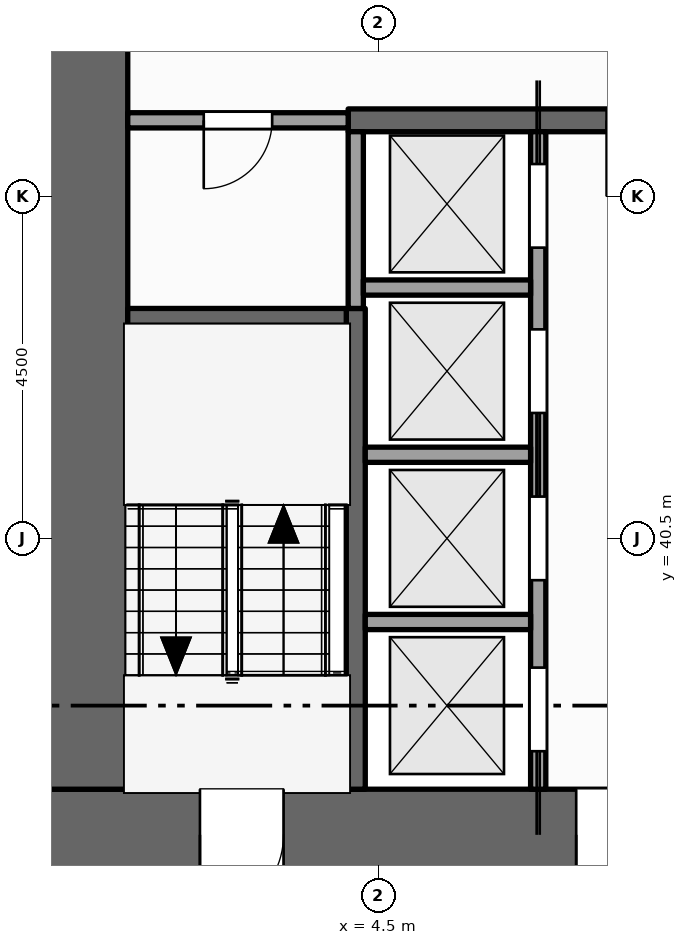
"""IFC4 building model, lengths in metres.
Left out: names, types, materials, properties, quantities, classifications, styles, units other than length and angle.
Written with IfcOpenShell. Run it as: python <this file> out.ifc"""

import sys

from ifc_helpers import new_model, si_unit, direction, frame, frame_2d, origin, place, context, subcontext, project, spatial, rectangle, extrude, element, fill, save


model = new_model("IFC4")
c1 = context("Model", 3, precision=1e-05, world=origin(), true_north=direction((0.0, 1.0)))
c2 = subcontext(c1, "Body", "Model", "MODEL_VIEW")
j1 = project(units=[si_unit("LENGTHUNIT", "METRE"), si_unit("PLANEANGLEUNIT", "RADIAN")], contexts=[c1])
p1 = place(None, origin())
s1 = spatial("IfcSite", under=j1, at=p1, CompositionType="ELEMENT")
p2 = place(p1, origin())
s2 = spatial("IfcBuilding", under=s1, at=p2, CompositionType="ELEMENT")
p3 = place(p2, frame((0.0, 0.0, 8.0)))
s3 = spatial("IfcBuildingStorey", under=s2, at=p3, CompositionType="ELEMENT", Elevation=8.0)
p4 = place(p3, frame((0.0, 36.6, -0.15), z_axis=(0.0, 0.0, 1.0), x_axis=(1.0, 0.0, 0.0)))
e1 = element("IfcWall", 1, at=p4, inside=s3, PredefinedType="SHEAR", context=c2, shape_type="SweptSolid", body=[
    extrude(rectangle(XDim=22.5, YDim=1.2, at=frame_2d((11.25, 0.0))), origin(), (0.0, 0.0, 1.0), 6.0),
])
p5 = place(p4, frame((7.1, 0.0, 0.15)))
e2 = element("IfcOpeningElement", 2, at=p5, cuts=e1, PredefinedType="OPENING", context=c2, shape_type="SweptSolid", body=[
    extrude(rectangle(XDim=1.8, YDim=2.1, at=frame_2d((0.9, 1.05))), frame((0.0, 0.61, 0.0), z_axis=(0.0, -1.0, 0.0), x_axis=(1.0, 0.0, 0.0)), (0.0, 0.0, 1.0), 1.22),
])
p6 = place(p4, frame((13.15, 0.0, 0.15)))
e3 = element("IfcOpeningElement", 3, at=p6, cuts=e1, PredefinedType="OPENING", context=c2, shape_type="SweptSolid", body=[
    extrude(rectangle(XDim=1.1, YDim=2.1, at=frame_2d((0.55, 1.05))), frame((0.0, 0.61, 0.0), z_axis=(0.0, -1.0, 0.0), x_axis=(1.0, 0.0, 0.0)), (0.0, 0.0, 1.0), 1.22),
])
p7 = place(p4, frame((2.15, 0.0, 0.15)))
e4 = element("IfcOpeningElement", 4, at=p7, cuts=e1, PredefinedType="OPENING", context=c2, shape_type="SweptSolid", body=[
    extrude(rectangle(XDim=1.1, YDim=2.1, at=frame_2d((0.55, 1.05))), frame((0.0, 0.61, 0.0), z_axis=(0.0, -1.0, 0.0), x_axis=(1.0, 0.0, 0.0)), (0.0, 0.0, 1.0), 1.22),
])
p8 = place(p4, frame((19.35, 0.0, 0.15)))
e5 = element("IfcOpeningElement", 5, at=p8, cuts=e1, PredefinedType="OPENING", context=c2, shape_type="SweptSolid", body=[
    extrude(rectangle(XDim=1.1, YDim=2.1, at=frame_2d((0.55, 1.05))), frame((0.0, 0.61, 0.0), z_axis=(0.0, -1.0, 0.0), x_axis=(1.0, 0.0, 0.0)), (0.0, 0.0, 1.0), 1.22),
])
p9 = place(p3, frame((0.6, 37.2, -0.15), z_axis=(0.0, 0.0, 1.0), x_axis=(0.0, 1.0, 0.0)))
e6 = element("IfcWall", 6, at=p9, inside=s3, PredefinedType="SHEAR", context=c2, shape_type="SweptSolid", body=[
    extrude(rectangle(XDim=11.1, YDim=1.2, at=frame_2d((5.55, 0.0))), origin(), (0.0, 0.0, 1.0), 6.0),
])
p10 = place(p3, frame((4.2, 37.2, 0.0), z_axis=(0.0, 0.0, 1.0), x_axis=(0.0, 1.0, 0.0)))
e7 = element("IfcWall", 7, at=p10, inside=s3, PredefinedType="SHEAR", context=c2, shape_type="SweptSolid", body=[
    extrude(rectangle(XDim=6.325, YDim=0.25, at=frame_2d((3.163, 0.0))), origin(), (0.0, 0.0, 1.0), 5.75),
])
p11 = place(p3, frame((4.2, 43.525, 0.0), z_axis=(0.0, 0.0, 1.0), x_axis=(0.0, 1.0, 0.0)))
e8 = element("IfcWall", 8, at=p11, inside=s3, PredefinedType="SOLIDWALL", context=c2, shape_type="SweptSolid", body=[
    extrude(rectangle(XDim=2.325, YDim=0.2, at=frame_2d((1.163, 0.0))), origin(), (0.0, 0.0, 1.0), 5.75),
])
p12 = place(p3, frame((6.6, 37.2, 0.0), z_axis=(0.0, 0.0, 1.0), x_axis=(0.0, 1.0, 0.0)))
e9 = element("IfcWall", 9, at=p12, inside=s3, PredefinedType="SOLIDWALL", context=c2, shape_type="SweptSolid", body=[
    extrude(rectangle(XDim=8.65, YDim=0.2, at=frame_2d((4.325, 0.0))), origin(), (0.0, 0.0, 1.0), 5.75),
])
p13 = place(p12, frame((0.5, 0.0, 0.012)))
e10 = element("IfcOpeningElement", 10, at=p13, cuts=e9, PredefinedType="OPENING", context=c2, shape_type="SweptSolid", body=[
    extrude(rectangle(XDim=1.1, YDim=2.1, at=frame_2d((0.55, 1.05))), frame((0.0, 0.11, 0.0), z_axis=(0.0, -1.0, 0.0), x_axis=(1.0, 0.0, 0.0)), (0.0, 0.0, 1.0), 0.22),
])
p14 = place(p12, frame((2.75, 0.0, 0.012)))
e11 = element("IfcOpeningElement", 11, at=p14, cuts=e9, PredefinedType="OPENING", context=c2, shape_type="SweptSolid", body=[
    extrude(rectangle(XDim=1.1, YDim=2.1, at=frame_2d((0.55, 1.05))), frame((0.0, 0.11, 0.0), z_axis=(0.0, -1.0, 0.0), x_axis=(1.0, 0.0, 0.0)), (0.0, 0.0, 1.0), 0.22),
])
p15 = place(p12, frame((4.95, 0.0, 0.012)))
e12 = element("IfcOpeningElement", 12, at=p15, cuts=e9, PredefinedType="OPENING", context=c2, shape_type="SweptSolid", body=[
    extrude(rectangle(XDim=1.1, YDim=2.1, at=frame_2d((0.55, 1.05))), frame((0.0, 0.11, 0.0), z_axis=(0.0, -1.0, 0.0), x_axis=(1.0, 0.0, 0.0)), (0.0, 0.0, 1.0), 0.22),
])
p16 = place(p12, frame((7.125, 0.0, 0.012)))
e13 = element("IfcOpeningElement", 13, at=p16, cuts=e9, PredefinedType="OPENING", context=c2, shape_type="SweptSolid", body=[
    extrude(rectangle(XDim=1.1, YDim=2.1, at=frame_2d((0.55, 1.05))), frame((0.0, 0.11, 0.0), z_axis=(0.0, -1.0, 0.0), x_axis=(1.0, 0.0, 0.0)), (0.0, 0.0, 1.0), 0.22),
])
for number, where, z_axis, x_axis in (
    (14, (4.325, 39.4, 0.0), (0.0, 0.0, 1.0), (1.0, 0.0, 0.0)),
    (15, (4.325, 41.6, 0.0), (0.0, 0.0, 1.0), (1.0, 0.0, 0.0)),
):
    element("IfcWall", number, at=place(p3, frame(where, z_axis=z_axis, x_axis=x_axis)), inside=s3, PredefinedType="SOLIDWALL", context=c2, shape_type="SweptSolid", body=[
        extrude(rectangle(XDim=2.175, YDim=0.2, at=frame_2d((1.087, 0.0))), origin(), (0.0, 0.0, 1.0), 5.75),
    ])
p17 = place(p3, frame((1.2, 43.4, 0.0), z_axis=(0.0, 0.0, 1.0), x_axis=(1.0, 0.0, 0.0)))
e16 = element("IfcWall", 16, at=p17, inside=s3, PredefinedType="SHEAR", context=c2, shape_type="SweptSolid", body=[
    extrude(rectangle(XDim=2.875, YDim=0.25, at=frame_2d((1.438, 0.0))), origin(), (0.0, 0.0, 1.0), 5.75),
])
p18 = place(p3, frame((4.3, 43.8, 0.0), z_axis=(0.0, 0.0, 1.0), x_axis=(1.0, 0.0, 0.0)))
e17 = element("IfcWall", 17, at=p18, inside=s3, PredefinedType="SOLIDWALL", context=c2, shape_type="SweptSolid", body=[
    extrude(rectangle(XDim=2.2, YDim=0.2, at=frame_2d((1.1, 0.0))), origin(), (0.0, 0.0, 1.0), 5.75),
])
p19 = place(p3, frame((1.2, 46.0, 0.0), z_axis=(0.0, 0.0, 1.0), x_axis=(1.0, 0.0, 0.0)))
e18 = element("IfcWall", 18, at=p19, inside=s3, PredefinedType="PARTITIONING", context=c2, shape_type="SweptSolid", body=[
    extrude(rectangle(XDim=2.9, YDim=0.2, at=frame_2d((1.45, 0.0))), origin(), (0.0, 0.0, 1.0), 5.75),
])
p20 = place(p19, frame((1.0, 0.0, 0.0)))
e19 = element("IfcOpeningElement", 19, at=p20, cuts=e18, PredefinedType="OPENING", context=c2, shape_type="SweptSolid", body=[
    extrude(rectangle(XDim=0.9, YDim=2.1, at=frame_2d((0.45, 1.05))), frame((0.0, 0.11, 0.0), z_axis=(0.0, -1.0, 0.0), x_axis=(1.0, 0.0, 0.0)), (0.0, 0.0, 1.0), 0.22),
])
p21 = place(p3, frame((4.1, 46.0, 0.0), z_axis=(0.0, 0.0, 1.0), x_axis=(1.0, 0.0, 0.0)))
e20 = element("IfcWall", 20, at=p21, inside=s3, PredefinedType="SHEAR", context=c2, shape_type="SweptSolid", body=[
    extrude(rectangle(XDim=14.5, YDim=0.3, at=frame_2d((7.25, 0.0))), origin(), (0.0, 0.0, 1.0), 5.75),
])
p22 = place(p21, frame((3.4, 0.0, 0.0)))
e21 = element("IfcOpeningElement", 21, at=p22, cuts=e20, PredefinedType="OPENING", context=c2, shape_type="SweptSolid", body=[
    extrude(rectangle(XDim=1.0, YDim=2.1, at=frame_2d((0.5, 1.05))), frame((0.0, 0.16, 0.0), z_axis=(0.0, -1.0, 0.0), x_axis=(1.0, 0.0, 0.0)), (0.0, 0.0, 1.0), 0.32),
])
p23 = place(p21, frame((9.1, 0.0, 0.0)))
e22 = element("IfcOpeningElement", 22, at=p23, cuts=e20, PredefinedType="OPENING", context=c2, shape_type="SweptSolid", body=[
    extrude(rectangle(XDim=1.0, YDim=2.1, at=frame_2d((0.5, 1.05))), frame((0.0, 0.16, 0.0), z_axis=(0.0, -1.0, 0.0), x_axis=(1.0, 0.0, 0.0)), (0.0, 0.0, 1.0), 0.32),
])
p24 = place(p13, origin())
e23 = element("IfcDoor", 23, at=p24, inside=s3, OperationType="SLIDING_TO_LEFT", PredefinedType="DOOR", context=c2, shape_type="SweptSolid", body=[
    extrude(rectangle(XDim=1.1, YDim=2.1, at=frame_2d((0.55, 1.05))), frame((0.0, 0.025, 0.0), z_axis=(0.0, -1.0, 0.0), x_axis=(1.0, 0.0, 0.0)), (0.0, 0.0, 1.0), 0.05),
])
fill(e10, e23)
p25 = place(p14, origin())
e24 = element("IfcDoor", 24, at=p25, inside=s3, OperationType="SLIDING_TO_RIGHT", PredefinedType="DOOR", context=c2, shape_type="SweptSolid", body=[
    extrude(rectangle(XDim=1.1, YDim=2.1, at=frame_2d((0.55, 1.05))), frame((0.0, 0.025, 0.0), z_axis=(0.0, -1.0, 0.0), x_axis=(1.0, 0.0, 0.0)), (0.0, 0.0, 1.0), 0.05),
])
fill(e11, e24)
p26 = place(p15, origin())
e25 = element("IfcDoor", 25, at=p26, inside=s3, OperationType="SLIDING_TO_LEFT", PredefinedType="DOOR", context=c2, shape_type="SweptSolid", body=[
    extrude(rectangle(XDim=1.1, YDim=2.1, at=frame_2d((0.55, 1.05))), frame((0.0, 0.025, 0.0), z_axis=(0.0, -1.0, 0.0), x_axis=(1.0, 0.0, 0.0)), (0.0, 0.0, 1.0), 0.05),
])
fill(e12, e25)
p27 = place(p16, origin())
e26 = element("IfcDoor", 26, at=p27, inside=s3, OperationType="SLIDING_TO_RIGHT", PredefinedType="DOOR", context=c2, shape_type="SweptSolid", body=[
    extrude(rectangle(XDim=1.1, YDim=2.1, at=frame_2d((0.55, 1.05))), frame((0.0, 0.025, 0.0), z_axis=(0.0, -1.0, 0.0), x_axis=(1.0, 0.0, 0.0)), (0.0, 0.0, 1.0), 0.05),
])
fill(e13, e26)
p28 = place(p5, origin())
e27 = element("IfcDoor", 27, at=p28, inside=s3, OperationType="DOUBLE_DOOR_SINGLE_SWING", PredefinedType="DOOR", context=c2, shape_type="SweptSolid", body=[
    extrude(rectangle(XDim=1.8, YDim=2.1, at=frame_2d((0.9, 1.05))), frame((0.0, 0.025, 0.0), z_axis=(0.0, -1.0, 0.0), x_axis=(1.0, 0.0, 0.0)), (0.0, 0.0, 1.0), 0.05),
])
fill(e2, e27)
p29 = place(p7, origin())
e28 = element("IfcDoor", 28, at=p29, inside=s3, OperationType="SINGLE_SWING_LEFT", PredefinedType="DOOR", context=c2, shape_type="SweptSolid", body=[
    extrude(rectangle(XDim=1.1, YDim=2.1, at=frame_2d((0.55, 1.05))), frame((0.0, 0.025, 0.0), z_axis=(0.0, -1.0, 0.0), x_axis=(1.0, 0.0, 0.0)), (0.0, 0.0, 1.0), 0.05),
])
fill(e4, e28)
p30 = place(p20, origin())
e29 = element("IfcDoor", 29, at=p30, inside=s3, OperationType="SINGLE_SWING_LEFT", PredefinedType="DOOR", context=c2, shape_type="SweptSolid", body=[
    extrude(rectangle(XDim=0.9, YDim=2.1, at=frame_2d((0.45, 1.05))), frame((0.0, 0.025, 0.0), z_axis=(0.0, -1.0, 0.0), x_axis=(1.0, 0.0, 0.0)), (0.0, 0.0, 1.0), 0.05),
])
fill(e19, e29)
save(model, sys.argv[1])
